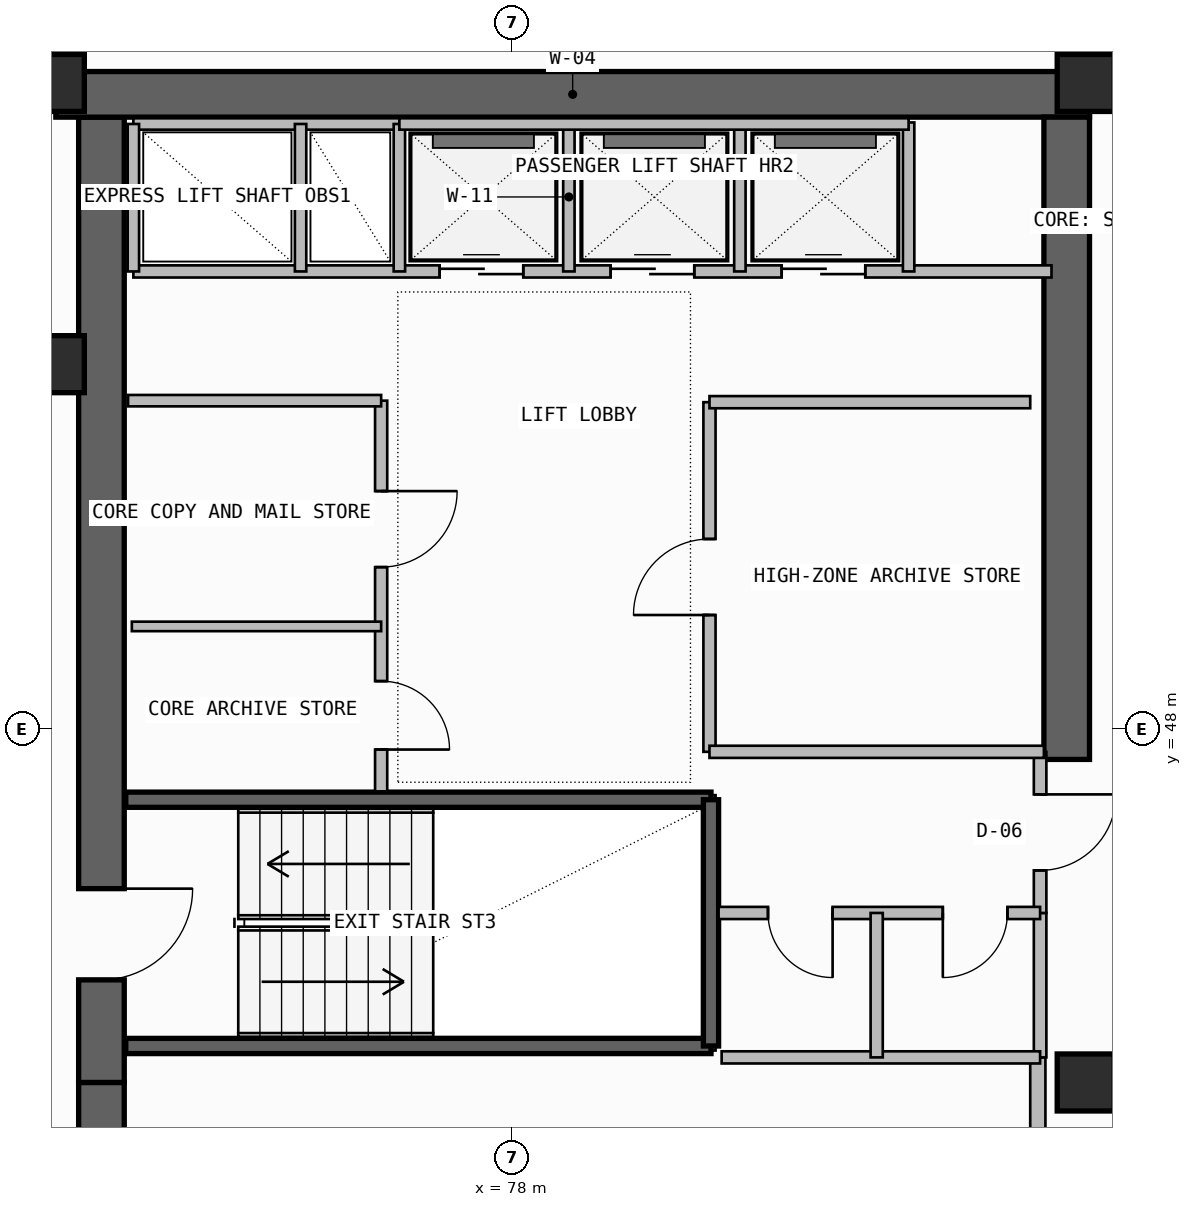
"""IFC4 building model, lengths in metres.
Left out: names, types, materials, properties, quantities, classifications, styles, units other than length and angle.
Written with IfcOpenShell. Run it as: python <this file> out.ifc"""

import sys

from ifc_helpers import new_model, si_unit, direction, frame, frame_2d, origin, origin_2d, place, context, subcontext, project, spatial, rectangle, extrude, element, fill, save


model = new_model("IFC4")
c1 = context("Model", 3, precision=1e-05, world=origin(), true_north=direction((0.0, 1.0)))
c2 = subcontext(c1, "Body", "Model", "MODEL_VIEW")
j1 = project(units=[si_unit("LENGTHUNIT", "METRE"), si_unit("PLANEANGLEUNIT", "RADIAN")], contexts=[c1])
p1 = place(None, origin())
s1 = spatial("IfcSite", under=j1, at=p1, CompositionType="ELEMENT")
p2 = place(p1, origin())
s2 = spatial("IfcBuilding", under=s1, at=p2, CompositionType="ELEMENT")
p3 = place(p2, frame((0.0, 0.0, 271.3)))
s3 = spatial("IfcBuildingStorey", under=s2, at=p3, CompositionType="ELEMENT", Elevation=271.3)
p4 = place(p3, frame((72.6, 35.5, -0.26), z_axis=(0.0, 0.0, 1.0), x_axis=(0.0, 1.0, 0.0)))
e1 = element("IfcWall", 1, at=p4, inside=s3, PredefinedType="SHEAR", context=c2, shape_type="SweptSolid", body=[
    extrude(rectangle(XDim=7.85, YDim=0.6, at=frame_2d((3.925, 0.0))), origin(), (0.0, 0.0, 1.0), 3.52),
])
p5 = place(p4, frame((1.45, 0.0, 0.26)))
e2 = element("IfcOpeningElement", 2, at=p5, cuts=e1, PredefinedType="OPENING", context=c2, shape_type="SweptSolid", body=[
    extrude(rectangle(XDim=1.2, YDim=2.2, at=frame_2d((0.6, 1.1))), frame((0.0, 0.31, 0.0), z_axis=(0.0, -1.0, 0.0), x_axis=(1.0, 0.0, 0.0)), (0.0, 0.0, 1.0), 0.62),
])
p6 = place(p3, frame((72.6, 43.35, -0.26), z_axis=(0.0, 0.0, 1.0), x_axis=(0.0, 1.0, 0.0)))
e3 = element("IfcWall", 3, at=p6, inside=s3, PredefinedType="SHEAR", context=c2, shape_type="SweptSolid", body=[
    extrude(rectangle(XDim=12.7, YDim=0.6, at=frame_2d((6.35, 0.0))), origin(), (0.0, 0.0, 1.0), 3.52),
])
p7 = place(p6, frame((1.35, 0.0, 0.26)))
e4 = element("IfcOpeningElement", 4, at=p7, cuts=e3, PredefinedType="OPENING", context=c2, shape_type="SweptSolid", body=[
    extrude(rectangle(XDim=1.2, YDim=2.2, at=frame_2d((0.6, 1.1))), frame((0.0, 0.31, 0.0), z_axis=(0.0, -1.0, 0.0), x_axis=(1.0, 0.0, 0.0)), (0.0, 0.0, 1.0), 0.62),
])
p8 = place(p3, frame((72.0, 56.35, -0.26), z_axis=(0.0, 0.0, 1.0), x_axis=(1.0, 0.0, 0.0)))
e5 = element("IfcWall", 5, at=p8, inside=s3, PredefinedType="SHEAR", context=c2, shape_type="SweptSolid", body=[
    extrude(rectangle(XDim=13.6, YDim=0.6, at=frame_2d((6.8, 0.0))), origin(), (0.0, 0.0, 1.0), 3.52),
])
p9 = place(p3, frame((85.3, 47.6, -0.26), z_axis=(0.0, 0.0, 1.0), x_axis=(0.0, 1.0, 0.0)))
e6 = element("IfcWall", 6, at=p9, inside=s3, PredefinedType="SHEAR", context=c2, shape_type="SweptSolid", body=[
    extrude(rectangle(XDim=8.45, YDim=0.6, at=frame_2d((4.225, 0.0))), origin(), (0.0, 0.0, 1.0), 3.52),
])
for number, where, z_axis, x_axis in (
    (7, (85.55, 43.35, 0.0), (0.0, 0.0, 1.0), (1.0, 0.0, 0.0)),
    (8, (72.0, 52.8, 0.0), (0.0, 0.0, 1.0), (1.0, 0.0, 0.0)),
    (9, (72.0, 56.5, 0.0), (0.0, 0.0, 1.0), (1.0, 0.0, 0.0)),
    (10, (85.55, 56.5, 0.0), (0.0, 0.0, 1.0), (1.0, 0.0, 0.0)),
):
    element("IfcColumn", number, at=place(p3, frame(where, z_axis=z_axis, x_axis=x_axis)), inside=s3, PredefinedType="COLUMN", context=c2, shape_type="SweptSolid", body=[
        extrude(rectangle(XDim=0.75, YDim=0.75, at=origin_2d()), origin(), (0.0, 0.0, 1.0), 3.52),
    ])
p10 = place(p3, frame((84.92, 38.85, 0.0), z_axis=(0.0, 0.0, 1.0), x_axis=(0.0, 1.0, 0.0)))
e11 = element("IfcWall", 11, at=p10, inside=s3, PredefinedType="SOLIDWALL", context=c2, shape_type="SweptSolid", body=[
    extrude(rectangle(XDim=4.83, YDim=0.2, at=frame_2d((2.415, 0.0))), origin(), (0.0, 0.0, 1.0), 3.26),
])
p11 = place(p10, frame((1.25, 0.0, 0.0)))
e12 = element("IfcOpeningElement", 12, at=p11, cuts=e11, PredefinedType="OPENING", context=c2, shape_type="SweptSolid", body=[
    extrude(rectangle(XDim=1.1, YDim=2.2, at=frame_2d((0.55, 1.1))), frame((0.0, 0.11, 0.0), z_axis=(0.0, -1.0, 0.0), x_axis=(1.0, 0.0, 0.0)), (0.0, 0.0, 1.0), 0.22),
])
for number, where, z_axis, x_axis in (
    (13, (72.92, 43.83, -0.26), (0.0, 0.0, 1.0), (1.0, 0.0, 0.0)),
    (14, (72.92, 47.07, -0.26), (0.0, 0.0, 1.0), (1.0, 0.0, 0.0)),
):
    element("IfcWall", number, at=place(p3, frame(where, z_axis=z_axis, x_axis=x_axis)), inside=s3, PredefinedType="SOLIDWALL", context=c2, shape_type="SweptSolid", body=[
        extrude(rectangle(XDim=7.7, YDim=0.2, at=frame_2d((3.85, 0.0))), origin(), (0.0, 0.0, 1.0), 3.52),
    ])
p12 = place(p3, frame((80.62, 43.83, -0.26), z_axis=(0.0, 0.0, 1.0), x_axis=(0.0, 1.0, 0.0)))
e15 = element("IfcWall", 15, at=p12, inside=s3, PredefinedType="SOLIDWALL", context=c2, shape_type="SweptSolid", body=[
    extrude(rectangle(XDim=3.24, YDim=0.2, at=frame_2d((1.62, 0.0))), origin(), (0.0, 0.0, 1.0), 3.52),
])
p13 = place(p3, frame((84.95, 43.68, 0.0), z_axis=(0.0, 0.0, 1.0), x_axis=(0.0, 1.0, 0.0)))
e16 = element("IfcWall", 16, at=p13, inside=s3, PredefinedType="PLUMBINGWALL", context=c2, shape_type="SweptSolid", body=[
    extrude(rectangle(XDim=1.9, YDim=0.165, at=frame_2d((0.95, 0.0))), origin(), (0.0, 0.0, 1.0), 3.26),
])
p14 = place(p3, frame((84.95, 45.58, 0.0), z_axis=(0.0, 0.0, 1.0), x_axis=(0.0, 1.0, 0.0)))
e17 = element("IfcWall", 17, at=p14, inside=s3, PredefinedType="PARTITIONING", context=c2, shape_type="SweptSolid", body=[
    extrude(rectangle(XDim=2.12, YDim=0.165, at=frame_2d((1.06, 0.0))), origin(), (0.0, 0.0, 1.0), 3.26),
])
p15 = place(p14, frame((0.56, 0.0, 0.0)))
e18 = element("IfcOpeningElement", 18, at=p15, cuts=e17, PredefinedType="OPENING", context=c2, shape_type="SweptSolid", body=[
    extrude(rectangle(XDim=1.0, YDim=2.2, at=frame_2d((0.5, 1.1))), frame((0.0, 0.093, 0.0), z_axis=(0.0, -1.0, 0.0), x_axis=(1.0, 0.0, 0.0)), (0.0, 0.0, 1.0), 0.185),
])
p16 = place(p3, frame((80.72, 45.58, 0.0), z_axis=(0.0, 0.0, 1.0), x_axis=(1.0, 0.0, 0.0)))
e19 = element("IfcWall", 19, at=p16, inside=s3, PredefinedType="PLUMBINGWALL", context=c2, shape_type="SweptSolid", body=[
    extrude(rectangle(XDim=4.23, YDim=0.16, at=frame_2d((2.115, 0.0))), origin(), (0.0, 0.0, 1.0), 3.26),
])
p17 = place(p16, frame((0.65, 0.0, 0.0)))
e20 = element("IfcOpeningElement", 20, at=p17, cuts=e19, PredefinedType="OPENING", context=c2, shape_type="SweptSolid", body=[
    extrude(rectangle(XDim=0.85, YDim=2.05, at=frame_2d((0.425, 1.025))), frame((0.0, 0.09, 0.0), z_axis=(0.0, -1.0, 0.0), x_axis=(1.0, 0.0, 0.0)), (0.0, 0.0, 1.0), 0.18),
])
p18 = place(p16, frame((2.95, 0.0, 0.0)))
e21 = element("IfcOpeningElement", 21, at=p18, cuts=e19, PredefinedType="OPENING", context=c2, shape_type="SweptSolid", body=[
    extrude(rectangle(XDim=0.85, YDim=2.05, at=frame_2d((0.425, 1.025))), frame((0.0, 0.09, 0.0), z_axis=(0.0, -1.0, 0.0), x_axis=(1.0, 0.0, 0.0)), (0.0, 0.0, 1.0), 0.18),
])
p19 = place(p3, frame((80.76, 43.68, 0.0), z_axis=(0.0, 0.0, 1.0), x_axis=(1.0, 0.0, 0.0)))
e22 = element("IfcWall", 22, at=p19, inside=s3, PredefinedType="PLUMBINGWALL", context=c2, shape_type="SweptSolid", body=[
    extrude(rectangle(XDim=4.19, YDim=0.16, at=frame_2d((2.095, 0.0))), origin(), (0.0, 0.0, 1.0), 3.26),
])
p20 = place(p3, frame((82.8, 43.68, 0.0), z_axis=(0.0, 0.0, 1.0), x_axis=(0.0, 1.0, 0.0)))
e23 = element("IfcWall", 23, at=p20, inside=s3, PredefinedType="PLUMBINGWALL", context=c2, shape_type="SweptSolid", body=[
    extrude(rectangle(XDim=1.9, YDim=0.16, at=frame_2d((0.95, 0.0))), origin(), (0.0, 0.0, 1.0), 3.26),
])
p21 = place(p3, frame((76.28, 47.18, 0.0), z_axis=(0.0, 0.0, 1.0), x_axis=(0.0, 1.0, 0.0)))
e24 = element("IfcWall", 24, at=p21, inside=s3, PredefinedType="SOLIDWALL", context=c2, shape_type="SweptSolid", body=[
    extrude(rectangle(XDim=5.14, YDim=0.16, at=frame_2d((2.57, 0.0))), origin(), (0.0, 0.0, 1.0), 3.26),
])
p22 = place(p21, frame((0.55, 0.0, 0.0)))
e25 = element("IfcOpeningElement", 25, at=p22, cuts=e24, PredefinedType="OPENING", context=c2, shape_type="SweptSolid", body=[
    extrude(rectangle(XDim=0.9, YDim=2.1, at=frame_2d((0.45, 1.05))), frame((0.0, 0.09, 0.0), z_axis=(0.0, -1.0, 0.0), x_axis=(1.0, 0.0, 0.0)), (0.0, 0.0, 1.0), 0.18),
])
p23 = place(p21, frame((2.95, 0.0, 0.0)))
e26 = element("IfcOpeningElement", 26, at=p23, cuts=e24, PredefinedType="OPENING", context=c2, shape_type="SweptSolid", body=[
    extrude(rectangle(XDim=1.0, YDim=2.2, at=frame_2d((0.5, 1.1))), frame((0.0, 0.09, 0.0), z_axis=(0.0, -1.0, 0.0), x_axis=(1.0, 0.0, 0.0)), (0.0, 0.0, 1.0), 0.18),
])
p24 = place(p3, frame((72.95, 52.32, 0.0), z_axis=(0.0, 0.0, 1.0), x_axis=(1.0, 0.0, 0.0)))
e27 = element("IfcWall", 27, at=p24, inside=s3, PredefinedType="SOLIDWALL", context=c2, shape_type="SweptSolid", body=[
    extrude(rectangle(XDim=3.33, YDim=0.15, at=frame_2d((1.665, 0.0))), origin(), (0.0, 0.0, 1.0), 3.26),
])
p25 = place(p3, frame((73.0, 49.35, 0.0), z_axis=(0.0, 0.0, 1.0), x_axis=(1.0, 0.0, 0.0)))
e28 = element("IfcWall", 28, at=p25, inside=s3, PredefinedType="PARTITIONING", context=c2, shape_type="SweptSolid", body=[
    extrude(rectangle(XDim=3.28, YDim=0.125, at=frame_2d((1.64, 0.0))), origin(), (0.0, 0.0, 1.0), 3.26),
])
p26 = place(p3, frame((80.6, 47.7, 0.0), z_axis=(0.0, 0.0, 1.0), x_axis=(0.0, 1.0, 0.0)))
e29 = element("IfcWall", 29, at=p26, inside=s3, PredefinedType="SOLIDWALL", context=c2, shape_type="SweptSolid", body=[
    extrude(rectangle(XDim=4.6, YDim=0.16, at=frame_2d((2.3, 0.0))), origin(), (0.0, 0.0, 1.0), 3.26),
])
p27 = place(p26, frame((1.8, 0.0, 0.0)))
e30 = element("IfcOpeningElement", 30, at=p27, cuts=e29, PredefinedType="OPENING", context=c2, shape_type="SweptSolid", body=[
    extrude(rectangle(XDim=1.0, YDim=2.2, at=frame_2d((0.5, 1.1))), frame((0.0, 0.09, 0.0), z_axis=(0.0, -1.0, 0.0), x_axis=(1.0, 0.0, 0.0)), (0.0, 0.0, 1.0), 0.18),
])
p28 = place(p3, frame((80.6, 47.7, 0.0), z_axis=(0.0, 0.0, 1.0), x_axis=(1.0, 0.0, 0.0)))
e31 = element("IfcWall", 31, at=p28, inside=s3, PredefinedType="SOLIDWALL", context=c2, shape_type="SweptSolid", body=[
    extrude(rectangle(XDim=4.4, YDim=0.16, at=frame_2d((2.2, 0.0))), origin(), (0.0, 0.0, 1.0), 3.26),
])
p29 = place(p3, frame((80.6, 52.3, 0.0), z_axis=(0.0, 0.0, 1.0), x_axis=(1.0, 0.0, 0.0)))
e32 = element("IfcWall", 32, at=p29, inside=s3, PredefinedType="SOLIDWALL", context=c2, shape_type="SweptSolid", body=[
    extrude(rectangle(XDim=4.22, YDim=0.16, at=frame_2d((2.11, 0.0))), origin(), (0.0, 0.0, 1.0), 3.26),
])
p30 = place(p3, frame((73.02, 54.02, 0.0), z_axis=(0.0, 0.0, 1.0), x_axis=(1.0, 0.0, 0.0)))
e33 = element("IfcWall", 33, at=p30, inside=s3, PredefinedType="SOLIDWALL", context=c2, shape_type="SweptSolid", body=[
    extrude(rectangle(XDim=12.08, YDim=0.16, at=frame_2d((6.04, 0.0))), origin(), (0.0, 0.0, 1.0), 3.26),
])
p31 = place(p30, frame((4.03, 0.0, 0.0)))
e34 = element("IfcOpeningElement", 34, at=p31, cuts=e33, PredefinedType="OPENING", context=c2, shape_type="SweptSolid", body=[
    extrude(rectangle(XDim=1.1, YDim=2.25, at=frame_2d((0.55, 1.125))), frame((0.0, 0.09, 0.0), z_axis=(0.0, -1.0, 0.0), x_axis=(1.0, 0.0, 0.0)), (0.0, 0.0, 1.0), 0.18),
])
p32 = place(p30, frame((6.28, 0.0, 0.0)))
e35 = element("IfcOpeningElement", 35, at=p32, cuts=e33, PredefinedType="OPENING", context=c2, shape_type="SweptSolid", body=[
    extrude(rectangle(XDim=1.1, YDim=2.25, at=frame_2d((0.55, 1.125))), frame((0.0, 0.09, 0.0), z_axis=(0.0, -1.0, 0.0), x_axis=(1.0, 0.0, 0.0)), (0.0, 0.0, 1.0), 0.18),
])
p33 = place(p30, frame((8.53, 0.0, 0.0)))
e36 = element("IfcOpeningElement", 36, at=p33, cuts=e33, PredefinedType="OPENING", context=c2, shape_type="SweptSolid", body=[
    extrude(rectangle(XDim=1.1, YDim=2.25, at=frame_2d((0.55, 1.125))), frame((0.0, 0.09, 0.0), z_axis=(0.0, -1.0, 0.0), x_axis=(1.0, 0.0, 0.0)), (0.0, 0.0, 1.0), 0.18),
])
p34 = place(p3, frame((73.02, 55.96, 0.0), z_axis=(0.0, 0.0, 1.0), x_axis=(1.0, 0.0, 0.0)))
e37 = element("IfcWall", 37, at=p34, inside=s3, PredefinedType="SOLIDWALL", context=c2, shape_type="SweptSolid", body=[
    extrude(rectangle(XDim=3.5, YDim=0.15, at=frame_2d((1.75, 0.0))), origin(), (0.0, 0.0, 1.0), 3.26),
])
p35 = place(p3, frame((73.02, 54.02, 0.0), z_axis=(0.0, 0.0, 1.0), x_axis=(0.0, 1.0, 0.0)))
e38 = element("IfcWall", 38, at=p35, inside=s3, PredefinedType="PLUMBINGWALL", context=c2, shape_type="SweptSolid", body=[
    extrude(rectangle(XDim=1.94, YDim=0.15, at=frame_2d((0.97, 0.0))), origin(), (0.0, 0.0, 1.0), 3.26),
])
p36 = place(p3, frame((76.52, 54.02, 0.0), z_axis=(0.0, 0.0, 1.0), x_axis=(0.0, 1.0, 0.0)))
e39 = element("IfcWall", 39, at=p36, inside=s3, PredefinedType="SOLIDWALL", context=c2, shape_type="SweptSolid", body=[
    extrude(rectangle(XDim=1.94, YDim=0.15, at=frame_2d((0.97, 0.0))), origin(), (0.0, 0.0, 1.0), 3.26),
])
p37 = place(p3, frame((75.22, 54.02, 0.0), z_axis=(0.0, 0.0, 1.0), x_axis=(0.0, 1.0, 0.0)))
e40 = element("IfcWall", 40, at=p37, inside=s3, PredefinedType="PLUMBINGWALL", context=c2, shape_type="SweptSolid", body=[
    extrude(rectangle(XDim=1.94, YDim=0.15, at=frame_2d((0.97, 0.0))), origin(), (0.0, 0.0, 1.0), 3.26),
])
for number, where, z_axis, x_axis in (
    (41, (78.75, 54.02, 0.0), (0.0, 0.0, 1.0), (0.0, 1.0, 0.0)),
    (42, (81.0, 54.02, 0.0), (0.0, 0.0, 1.0), (0.0, 1.0, 0.0)),
):
    element("IfcWall", number, at=place(p3, frame(where, z_axis=z_axis, x_axis=x_axis)), inside=s3, PredefinedType="PLUMBINGWALL", context=c2, shape_type="SweptSolid", body=[
        extrude(rectangle(XDim=1.96, YDim=0.15, at=frame_2d((0.98, 0.0))), origin(), (0.0, 0.0, 1.0), 3.26),
    ])
p38 = place(p3, frame((83.22, 54.02, 0.0), z_axis=(0.0, 0.0, 1.0), x_axis=(0.0, 1.0, 0.0)))
e43 = element("IfcWall", 43, at=p38, inside=s3, PredefinedType="SOLIDWALL", context=c2, shape_type="SweptSolid", body=[
    extrude(rectangle(XDim=1.96, YDim=0.15, at=frame_2d((0.98, 0.0))), origin(), (0.0, 0.0, 1.0), 3.26),
])
p39 = place(p3, frame((76.52, 55.96, 0.0), z_axis=(0.0, 0.0, 1.0), x_axis=(1.0, 0.0, 0.0)))
e44 = element("IfcWall", 44, at=p39, inside=s3, PredefinedType="SOLIDWALL", context=c2, shape_type="SweptSolid", body=[
    extrude(rectangle(XDim=6.7, YDim=0.15, at=frame_2d((3.35, 0.0))), origin(), (0.0, 0.0, 1.0), 3.26),
])
p40 = place(p7, frame((1.2, 0.0, 0.0), z_axis=(0.0, 0.0, 1.0), x_axis=(-1.0, 0.0, 0.0)))
e45 = element("IfcDoor", 45, at=p40, inside=s3, OperationType="SINGLE_SWING_LEFT", PredefinedType="USERDEFINED", context=c2, shape_type="SweptSolid", body=[
    extrude(rectangle(XDim=1.2, YDim=2.2, at=frame_2d((0.6, 1.1))), frame((0.0, 0.025, 0.0), z_axis=(0.0, -1.0, 0.0), x_axis=(1.0, 0.0, 0.0)), (0.0, 0.0, 1.0), 0.05),
])
fill(e4, e45)
p41 = place(p15, frame((1.0, 0.0, 0.0), z_axis=(0.0, 0.0, 1.0), x_axis=(-1.0, 0.0, 0.0)))
e46 = element("IfcDoor", 46, at=p41, inside=s3, OperationType="SINGLE_SWING_LEFT", PredefinedType="DOOR", context=c2, shape_type="SweptSolid", body=[
    extrude(rectangle(XDim=1.0, YDim=2.2, at=frame_2d((0.5, 1.1))), frame((0.0, 0.025, 0.0), z_axis=(0.0, -1.0, 0.0), x_axis=(1.0, 0.0, 0.0)), (0.0, 0.0, 1.0), 0.05),
])
fill(e18, e46)
p42 = place(p17, frame((0.85, 0.0, 0.0), z_axis=(0.0, 0.0, 1.0), x_axis=(-1.0, 0.0, 0.0)))
e47 = element("IfcDoor", 47, at=p42, inside=s3, OperationType="SINGLE_SWING_LEFT", PredefinedType="DOOR", context=c2, shape_type="SweptSolid", body=[
    extrude(rectangle(XDim=0.85, YDim=2.05, at=frame_2d((0.425, 1.025))), frame((0.0, 0.025, 0.0), z_axis=(0.0, -1.0, 0.0), x_axis=(1.0, 0.0, 0.0)), (0.0, 0.0, 1.0), 0.05),
])
fill(e20, e47)
p43 = place(p18, frame((0.85, 0.0, 0.0), z_axis=(0.0, 0.0, 1.0), x_axis=(-1.0, 0.0, 0.0)))
e48 = element("IfcDoor", 48, at=p43, inside=s3, OperationType="SINGLE_SWING_RIGHT", PredefinedType="DOOR", context=c2, shape_type="SweptSolid", body=[
    extrude(rectangle(XDim=0.85, YDim=2.05, at=frame_2d((0.425, 1.025))), frame((0.0, 0.025, 0.0), z_axis=(0.0, -1.0, 0.0), x_axis=(1.0, 0.0, 0.0)), (0.0, 0.0, 1.0), 0.05),
])
fill(e21, e48)
p44 = place(p22, frame((0.9, 0.0, 0.0), z_axis=(0.0, 0.0, 1.0), x_axis=(-1.0, 0.0, 0.0)))
e49 = element("IfcDoor", 49, at=p44, inside=s3, OperationType="SINGLE_SWING_RIGHT", PredefinedType="DOOR", context=c2, shape_type="SweptSolid", body=[
    extrude(rectangle(XDim=0.9, YDim=2.1, at=frame_2d((0.45, 1.05))), frame((0.0, 0.025, 0.0), z_axis=(0.0, -1.0, 0.0), x_axis=(1.0, 0.0, 0.0)), (0.0, 0.0, 1.0), 0.05),
])
fill(e25, e49)
p45 = place(p23, frame((1.0, 0.0, 0.0), z_axis=(0.0, 0.0, 1.0), x_axis=(-1.0, 0.0, 0.0)))
e50 = element("IfcDoor", 50, at=p45, inside=s3, OperationType="SINGLE_SWING_LEFT", PredefinedType="DOOR", context=c2, shape_type="SweptSolid", body=[
    extrude(rectangle(XDim=1.0, YDim=2.2, at=frame_2d((0.5, 1.1))), frame((0.0, 0.025, 0.0), z_axis=(0.0, -1.0, 0.0), x_axis=(1.0, 0.0, 0.0)), (0.0, 0.0, 1.0), 0.05),
])
fill(e26, e50)
p46 = place(p27, origin())
e51 = element("IfcDoor", 51, at=p46, inside=s3, OperationType="SINGLE_SWING_LEFT", PredefinedType="DOOR", context=c2, shape_type="SweptSolid", body=[
    extrude(rectangle(XDim=1.0, YDim=2.2, at=frame_2d((0.5, 1.1))), frame((0.0, 0.025, 0.0), z_axis=(0.0, -1.0, 0.0), x_axis=(1.0, 0.0, 0.0)), (0.0, 0.0, 1.0), 0.05),
])
fill(e30, e51)
p47 = place(p31, origin())
e52 = element("IfcDoor", 52, at=p47, inside=s3, OperationType="DOUBLE_DOOR_SLIDING", PredefinedType="DOOR", context=c2, shape_type="SweptSolid", body=[
    extrude(rectangle(XDim=1.1, YDim=2.25, at=frame_2d((0.55, 1.125))), frame((0.0, 0.025, 0.0), z_axis=(0.0, -1.0, 0.0), x_axis=(1.0, 0.0, 0.0)), (0.0, 0.0, 1.0), 0.05),
])
fill(e34, e52)
p48 = place(p32, origin())
e53 = element("IfcDoor", 53, at=p48, inside=s3, OperationType="DOUBLE_DOOR_SLIDING", PredefinedType="DOOR", context=c2, shape_type="SweptSolid", body=[
    extrude(rectangle(XDim=1.1, YDim=2.25, at=frame_2d((0.55, 1.125))), frame((0.0, 0.025, 0.0), z_axis=(0.0, -1.0, 0.0), x_axis=(1.0, 0.0, 0.0)), (0.0, 0.0, 1.0), 0.05),
])
fill(e35, e53)
p49 = place(p33, origin())
e54 = element("IfcDoor", 54, at=p49, inside=s3, OperationType="DOUBLE_DOOR_SLIDING", PredefinedType="DOOR", context=c2, shape_type="SweptSolid", body=[
    extrude(rectangle(XDim=1.1, YDim=2.25, at=frame_2d((0.55, 1.125))), frame((0.0, 0.025, 0.0), z_axis=(0.0, -1.0, 0.0), x_axis=(1.0, 0.0, 0.0)), (0.0, 0.0, 1.0), 0.05),
])
fill(e36, e54)
save(model, sys.argv[1])
